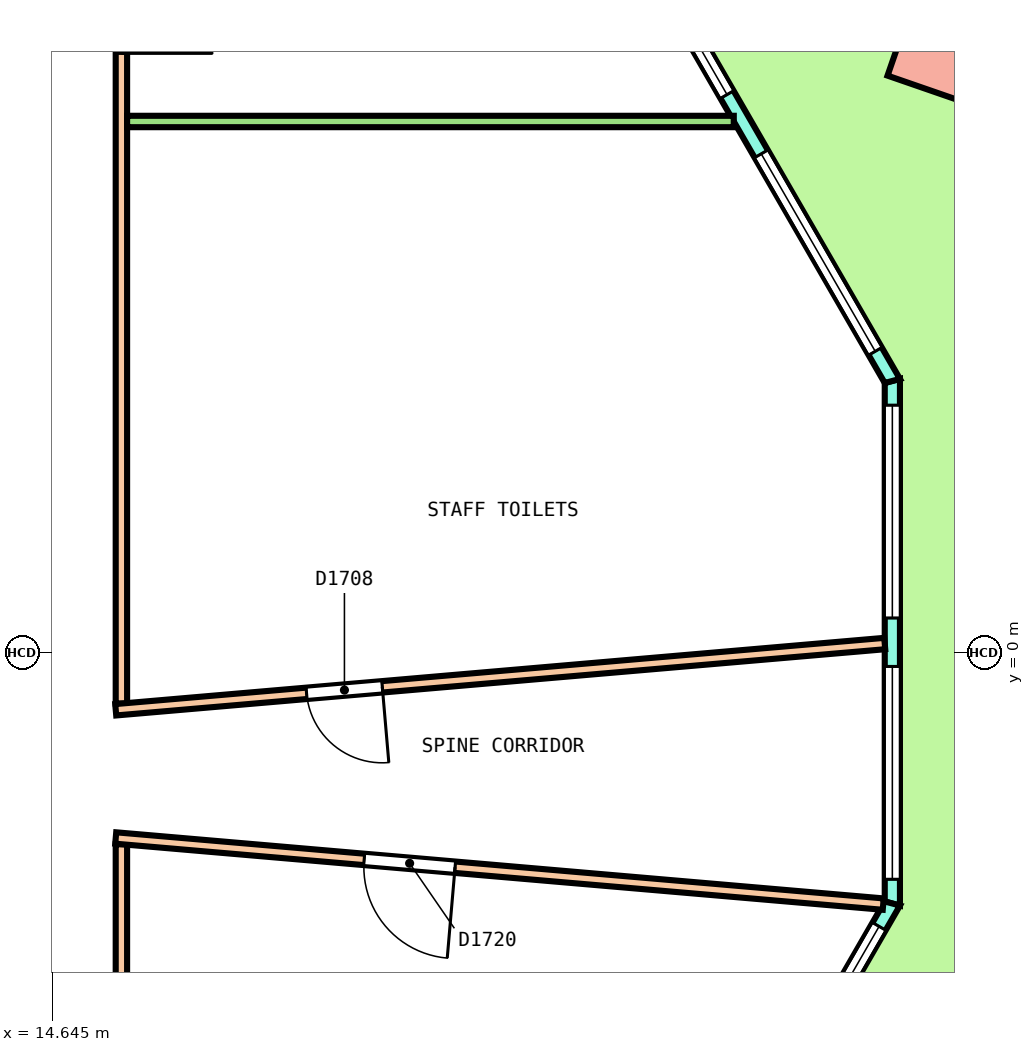
"""IFC4 building model, lengths in metres.
Left out: names, types, materials, properties, quantities, classifications, styles, units other than length and angle.
Written with IfcOpenShell. Run it as: python <this file> out.ifc"""

import sys

from ifc_helpers import new_model, si_unit, direction, frame, frame_2d, origin, origin_2d, place, context, subcontext, project, spatial, polyline, rectangle, outline, extrude, element, fill, save


model = new_model("IFC4")
c1 = context("Model", 3, precision=1e-05, world=origin(), true_north=direction((0.0, 1.0)))
c2 = subcontext(c1, "Body", "Model", "MODEL_VIEW")
j1 = project(units=[si_unit("LENGTHUNIT", "METRE"), si_unit("PLANEANGLEUNIT", "RADIAN")], contexts=[c1])
p1 = place(None, origin())
s1 = spatial("IfcSite", under=j1, at=p1, CompositionType="ELEMENT")
p2 = place(p1, origin())
s2 = spatial("IfcBuilding", under=s1, at=p2, CompositionType="ELEMENT")
p3 = place(p2, frame((0.0, 0.0, 149.6)))
s3 = spatial("IfcBuildingStorey", under=s2, at=p3, CompositionType="ELEMENT", Elevation=149.6)
p4 = place(p3, frame((26.393, 7.963, 0.0), z_axis=(0.021750699922, 0.025124769716, 0.999447673968), x_axis=(-0.500502376835, 0.865666925982, -0.010869408614)))
e1 = element("IfcColumn", 1, at=p4, inside=s3, PredefinedType="COLUMN", context=c2, shape_type="SweptSolid", body=[
    extrude(rectangle(XDim=1.2, YDim=1.2, at=origin_2d()), origin(), (0.0, 0.0, 1.0), 4.052),
])
p5 = place(p3, frame((25.693, -3.299, 0.0), z_axis=(0.0, 0.0, 1.0), x_axis=(0.0, 1.0, 0.0)))
e2 = element("IfcWall", 2, at=p5, inside=s3, PredefinedType="SOLIDWALL", context=c2, shape_type="SweptSolid", body=[
    extrude(outline(polyline([(-0.027, -0.1), (1.128, -0.1), (2.283, -0.1), (3.438, -0.1), (4.592, -0.1), (5.747, -0.1), (6.902, -0.1), (6.848, 0.1), (5.711, 0.1), (4.574, 0.1), (3.438, 0.1), (2.301, 0.1), (1.164, 0.1), (0.027, 0.1), (-0.027, -0.1)])), origin(), (0.0, 0.0, 1.0), 4.1),
])
p6 = place(p5, frame((0.319, 0.0, 0.1)))
e3 = element("IfcOpeningElement", 3, at=p6, cuts=e2, PredefinedType="OPENING", context=c2, shape_type="SweptSolid", body=[
    extrude(rectangle(XDim=2.8, YDim=2.9, at=frame_2d((1.4, 1.45))), frame((0.0, 0.11, 0.0), z_axis=(0.0, -1.0, 0.0), x_axis=(1.0, 0.0, 0.0)), (0.0, 0.0, 1.0), 0.22),
])
p7 = place(p5, frame((3.756, 0.0, 0.1)))
e4 = element("IfcOpeningElement", 4, at=p7, cuts=e2, PredefinedType="OPENING", context=c2, shape_type="SweptSolid", body=[
    extrude(rectangle(XDim=2.8, YDim=2.9, at=frame_2d((1.4, 1.45))), frame((0.0, 0.11, 0.0), z_axis=(0.0, -1.0, 0.0), x_axis=(1.0, 0.0, 0.0)), (0.0, 0.0, 1.0), 0.22),
])
p8 = place(p3, frame((25.693, 3.576, 0.0), z_axis=(0.0, 0.0, 1.0), x_axis=(-0.500002434251, 0.866023998365, 0.0)))
e5 = element("IfcWall", 5, at=p8, inside=s3, PredefinedType="SOLIDWALL", context=c2, shape_type="SweptSolid", body=[
    extrude(outline(polyline([(-0.027, -0.1), (1.002, -0.1), (2.031, -0.1), (3.061, -0.1), (4.09, -0.1), (5.119, -0.1), (6.148, -0.1), (7.177, -0.1), (8.206, -0.1), (9.235, -0.1), (10.264, -0.1), (11.293, -0.1), (12.323, -0.1), (13.352, -0.1), (14.381, -0.1), (15.41, -0.1), (16.439, -0.1), (17.468, -0.1), (18.497, -0.1), (19.526, -0.1), (19.473, 0.1), (18.449, 0.1), (17.426, 0.1), (16.402, 0.1), (15.379, 0.1), (14.355, 0.1), (13.332, 0.1), (12.308, 0.1), (11.285, 0.1), (10.261, 0.1), (9.238, 0.1), (8.215, 0.1), (7.191, 0.1), (6.168, 0.1), (5.144, 0.1), (4.121, 0.1), (3.097, 0.1), (2.074, 0.1), (1.05, 0.1), (0.027, 0.1), (-0.027, -0.1)])), origin(), (0.0, 0.0, 1.0), 4.1),
])
p9 = place(p8, frame((0.45, 0.0, 0.1)))
e6 = element("IfcOpeningElement", 6, at=p9, cuts=e5, PredefinedType="OPENING", context=c2, shape_type="SweptSolid", body=[
    extrude(rectangle(XDim=3.0, YDim=2.9, at=frame_2d((1.5, 1.45))), frame((0.0, 0.11, 0.0), z_axis=(0.0, -1.0, 0.0), x_axis=(1.0, 0.0, 0.0)), (0.0, 0.0, 1.0), 0.22),
])
p10 = place(p8, frame((4.35, 0.0, 0.1)))
e7 = element("IfcOpeningElement", 7, at=p10, cuts=e5, PredefinedType="OPENING", context=c2, shape_type="SweptSolid", body=[
    extrude(rectangle(XDim=3.0, YDim=2.9, at=frame_2d((1.5, 1.45))), frame((0.0, 0.11, 0.0), z_axis=(0.0, -1.0, 0.0), x_axis=(1.0, 0.0, 0.0)), (0.0, 0.0, 1.0), 0.22),
])
p11 = place(p8, frame((8.85, 0.0, 0.0)))
e8 = element("IfcOpeningElement", 8, at=p11, cuts=e5, PredefinedType="OPENING", context=c2, shape_type="SweptSolid", body=[
    extrude(rectangle(XDim=1.8, YDim=2.4, at=frame_2d((0.9, 1.2))), frame((0.0, 0.11, 0.0), z_axis=(0.0, -1.0, 0.0), x_axis=(1.0, 0.0, 0.0)), (0.0, 0.0, 1.0), 0.22),
])
p12 = place(p8, frame((8.85, 0.0, 2.55)))
e9 = element("IfcOpeningElement", 9, at=p12, cuts=e5, PredefinedType="OPENING", context=c2, shape_type="SweptSolid", body=[
    extrude(rectangle(XDim=1.8, YDim=0.45, at=frame_2d((0.9, 0.225))), frame((0.0, 0.11, 0.0), z_axis=(0.0, -1.0, 0.0), x_axis=(1.0, 0.0, 0.0)), (0.0, 0.0, 1.0), 0.22),
])
p13 = place(p8, frame((12.15, 0.0, 0.1)))
e10 = element("IfcOpeningElement", 10, at=p13, cuts=e5, PredefinedType="OPENING", context=c2, shape_type="SweptSolid", body=[
    extrude(rectangle(XDim=3.0, YDim=2.9, at=frame_2d((1.5, 1.45))), frame((0.0, 0.11, 0.0), z_axis=(0.0, -1.0, 0.0), x_axis=(1.0, 0.0, 0.0)), (0.0, 0.0, 1.0), 0.22),
])
p14 = place(p8, frame((16.05, 0.0, 0.1)))
e11 = element("IfcOpeningElement", 11, at=p14, cuts=e5, PredefinedType="OPENING", context=c2, shape_type="SweptSolid", body=[
    extrude(rectangle(XDim=3.0, YDim=2.9, at=frame_2d((1.5, 1.45))), frame((0.0, 0.11, 0.0), z_axis=(0.0, -1.0, 0.0), x_axis=(1.0, 0.0, 0.0)), (0.0, 0.0, 1.0), 0.22),
])
p15 = place(p3, frame((15.703, -20.601, 0.0), z_axis=(0.0, 0.0, 1.0), x_axis=(0.499997834957, 0.866026653769, 0.0)))
e12 = element("IfcWall", 12, at=p15, inside=s3, PredefinedType="SOLIDWALL", context=c2, shape_type="SweptSolid", body=[
    extrude(outline(polyline([(-0.027, -0.1), (1.028, -0.1), (2.082, -0.1), (3.136, -0.1), (4.19, -0.1), (5.245, -0.1), (6.299, -0.1), (7.354, -0.1), (8.408, -0.1), (9.462, -0.1), (10.516, -0.1), (11.571, -0.1), (12.625, -0.1), (13.679, -0.1), (14.734, -0.1), (15.788, -0.1), (16.842, -0.1), (17.897, -0.1), (18.951, -0.1), (20.005, -0.1), (19.952, 0.1), (18.903, 0.1), (17.854, 0.1), (16.806, 0.1), (15.757, 0.1), (14.708, 0.1), (13.66, 0.1), (12.611, 0.1), (11.562, 0.1), (10.514, 0.1), (9.465, 0.1), (8.416, 0.1), (7.368, 0.1), (6.319, 0.1), (5.27, 0.1), (4.221, 0.1), (3.173, 0.1), (2.124, 0.1), (1.075, 0.1), (0.027, 0.1), (-0.027, -0.1)])), origin(), (0.0, 0.0, 1.0), 4.1),
])
p16 = place(p15, frame((0.348, 0.0, 0.1)))
e13 = element("IfcOpeningElement", 13, at=p16, cuts=e12, PredefinedType="OPENING", context=c2, shape_type="SweptSolid", body=[
    extrude(rectangle(XDim=3.3, YDim=2.9, at=frame_2d((1.65, 1.45))), frame((0.0, 0.11, 0.0), z_axis=(0.0, -1.0, 0.0), x_axis=(1.0, 0.0, 0.0)), (0.0, 0.0, 1.0), 0.22),
])
p17 = place(p15, frame((4.344, 0.0, 0.1)))
e14 = element("IfcOpeningElement", 14, at=p17, cuts=e12, PredefinedType="OPENING", context=c2, shape_type="SweptSolid", body=[
    extrude(rectangle(XDim=3.3, YDim=2.9, at=frame_2d((1.65, 1.45))), frame((0.0, 0.11, 0.0), z_axis=(0.0, -1.0, 0.0), x_axis=(1.0, 0.0, 0.0)), (0.0, 0.0, 1.0), 0.22),
])
p18 = place(p15, frame((9.089, 0.0, 0.0)))
e15 = element("IfcOpeningElement", 15, at=p18, cuts=e12, PredefinedType="OPENING", context=c2, shape_type="SweptSolid", body=[
    extrude(rectangle(XDim=1.8, YDim=2.4, at=frame_2d((0.9, 1.2))), frame((0.0, 0.11, 0.0), z_axis=(0.0, -1.0, 0.0), x_axis=(1.0, 0.0, 0.0)), (0.0, 0.0, 1.0), 0.22),
])
p19 = place(p15, frame((9.089, 0.0, 2.55)))
e16 = element("IfcOpeningElement", 16, at=p19, cuts=e12, PredefinedType="OPENING", context=c2, shape_type="SweptSolid", body=[
    extrude(rectangle(XDim=1.8, YDim=0.45, at=frame_2d((0.9, 0.225))), frame((0.0, 0.11, 0.0), z_axis=(0.0, -1.0, 0.0), x_axis=(1.0, 0.0, 0.0)), (0.0, 0.0, 1.0), 0.22),
])
p20 = place(p15, frame((12.335, 0.0, 0.1)))
e17 = element("IfcOpeningElement", 17, at=p20, cuts=e12, PredefinedType="OPENING", context=c2, shape_type="SweptSolid", body=[
    extrude(rectangle(XDim=3.3, YDim=2.9, at=frame_2d((1.65, 1.45))), frame((0.0, 0.11, 0.0), z_axis=(0.0, -1.0, 0.0), x_axis=(1.0, 0.0, 0.0)), (0.0, 0.0, 1.0), 0.22),
])
p21 = place(p15, frame((16.331, 0.0, 0.1)))
e18 = element("IfcOpeningElement", 18, at=p21, cuts=e12, PredefinedType="OPENING", context=c2, shape_type="SweptSolid", body=[
    extrude(rectangle(XDim=3.3, YDim=2.9, at=frame_2d((1.65, 1.45))), frame((0.0, 0.11, 0.0), z_axis=(0.0, -1.0, 0.0), x_axis=(1.0, 0.0, 0.0)), (0.0, 0.0, 1.0), 0.22),
])
p22 = place(p3, frame((15.55, -10.375, 0.0), z_axis=(0.0, 0.0, 1.0), x_axis=(0.0, 1.0, 0.0)))
e19 = element("IfcWall", 19, at=p22, inside=s3, PredefinedType="PARTITIONING", context=c2, shape_type="SweptSolid", body=[
    extrude(rectangle(XDim=7.856, YDim=0.15, at=frame_2d((3.928, 0.0))), origin(), (0.0, 0.0, 1.0), 3.05),
])
p23 = place(p3, frame((15.55, -0.669, 0.0), z_axis=(0.0, 0.0, 1.0), x_axis=(0.0, 1.0, 0.0)))
e20 = element("IfcWall", 20, at=p23, inside=s3, PredefinedType="PARTITIONING", context=c2, shape_type="SweptSolid", body=[
    extrude(rectangle(XDim=11.044, YDim=0.15, at=frame_2d((5.522, 0.0))), origin(), (0.0, 0.0, 1.0), 3.05),
])
p24 = place(p23, frame((8.554, 0.0, 0.0)))
e21 = element("IfcOpeningElement", 21, at=p24, cuts=e20, PredefinedType="OPENING", context=c2, shape_type="SweptSolid", body=[
    extrude(rectangle(XDim=1.2, YDim=2.1, at=frame_2d((0.6, 1.05))), frame((0.0, 0.085, 0.0), z_axis=(0.0, -1.0, 0.0), x_axis=(1.0, 0.0, 0.0)), (0.0, 0.0, 1.0), 0.17),
])
p25 = place(p3, frame((15.475, -0.75, 0.0), z_axis=(0.0, 0.0, 1.0), x_axis=(0.99631178891, 0.085806871974, 0.0)))
e22 = element("IfcWall", 22, at=p25, inside=s3, PredefinedType="PARTITIONING", context=c2, shape_type="SweptSolid", body=[
    extrude(rectangle(XDim=10.155, YDim=0.15, at=frame_2d((5.077, 0.0))), origin(), (0.0, 0.0, 1.0), 3.05),
])
p26 = place(p25, frame((2.52, 0.0, 0.0)))
e23 = element("IfcOpeningElement", 23, at=p26, cuts=e22, PredefinedType="OPENING", context=c2, shape_type="SweptSolid", body=[
    extrude(rectangle(XDim=1.0, YDim=2.1, at=frame_2d((0.5, 1.05))), frame((0.0, 0.085, 0.0), z_axis=(0.0, -1.0, 0.0), x_axis=(1.0, 0.0, 0.0)), (0.0, 0.0, 1.0), 0.17),
])
p27 = place(p3, frame((15.475, -2.437, 0.0), z_axis=(0.0, 0.0, 1.0), x_axis=(0.99631166079, -0.085808359585, 0.0)))
e24 = element("IfcWall", 24, at=p27, inside=s3, PredefinedType="PARTITIONING", context=c2, shape_type="SweptSolid", body=[
    extrude(rectangle(XDim=10.135, YDim=0.15, at=frame_2d((5.067, 0.0))), origin(), (0.0, 0.0, 1.0), 3.05),
])
p28 = place(p27, frame((3.281, 0.0, 0.0)))
e25 = element("IfcOpeningElement", 25, at=p28, cuts=e24, PredefinedType="OPENING", context=c2, shape_type="SweptSolid", body=[
    extrude(rectangle(XDim=1.2, YDim=2.1, at=frame_2d((0.6, 1.05))), frame((0.0, 0.085, 0.0), z_axis=(0.0, -1.0, 0.0), x_axis=(1.0, 0.0, 0.0)), (0.0, 0.0, 1.0), 0.17),
])
p29 = place(p3, frame((15.625, 6.989, 0.0), z_axis=(0.0, 0.0, 1.0), x_axis=(1.0, 0.0, 0.0)))
e26 = element("IfcWall", 26, at=p29, inside=s3, PredefinedType="PARTITIONING", context=c2, shape_type="SweptSolid", body=[
    extrude(rectangle(XDim=7.981, YDim=0.15, at=frame_2d((3.991, 0.0))), origin(), (0.0, 0.0, 1.0), 3.05),
])
p30 = place(p6, origin())
e27 = element("IfcWindow", 27, at=p30, inside=s3, PartitioningType="SINGLE_PANEL", PredefinedType="WINDOW", context=c2, shape_type="SweptSolid", body=[
    extrude(rectangle(XDim=2.8, YDim=2.9, at=frame_2d((1.4, 1.45))), frame((0.0, 0.03, 0.0), z_axis=(0.0, -1.0, 0.0), x_axis=(1.0, 0.0, 0.0)), (0.0, 0.0, 1.0), 0.06),
])
fill(e3, e27)
p31 = place(p7, origin())
e28 = element("IfcWindow", 28, at=p31, inside=s3, PartitioningType="SINGLE_PANEL", PredefinedType="WINDOW", context=c2, shape_type="SweptSolid", body=[
    extrude(rectangle(XDim=2.8, YDim=2.9, at=frame_2d((1.4, 1.45))), frame((0.0, 0.03, 0.0), z_axis=(0.0, -1.0, 0.0), x_axis=(1.0, 0.0, 0.0)), (0.0, 0.0, 1.0), 0.06),
])
fill(e4, e28)
p32 = place(p9, origin())
e29 = element("IfcWindow", 29, at=p32, inside=s3, PartitioningType="SINGLE_PANEL", PredefinedType="WINDOW", context=c2, shape_type="SweptSolid", body=[
    extrude(rectangle(XDim=3.0, YDim=2.9, at=frame_2d((1.5, 1.45))), frame((0.0, 0.03, 0.0), z_axis=(0.0, -1.0, 0.0), x_axis=(1.0, 0.0, 0.0)), (0.0, 0.0, 1.0), 0.06),
])
fill(e6, e29)
p33 = place(p10, origin())
e30 = element("IfcWindow", 30, at=p33, inside=s3, PartitioningType="SINGLE_PANEL", PredefinedType="WINDOW", context=c2, shape_type="SweptSolid", body=[
    extrude(rectangle(XDim=3.0, YDim=2.9, at=frame_2d((1.5, 1.45))), frame((0.0, 0.03, 0.0), z_axis=(0.0, -1.0, 0.0), x_axis=(1.0, 0.0, 0.0)), (0.0, 0.0, 1.0), 0.06),
])
fill(e7, e30)
p34 = place(p21, origin())
e31 = element("IfcWindow", 31, at=p34, inside=s3, PartitioningType="SINGLE_PANEL", PredefinedType="WINDOW", context=c2, shape_type="SweptSolid", body=[
    extrude(rectangle(XDim=3.3, YDim=2.9, at=frame_2d((1.65, 1.45))), frame((0.0, 0.03, 0.0), z_axis=(0.0, -1.0, 0.0), x_axis=(1.0, 0.0, 0.0)), (0.0, 0.0, 1.0), 0.06),
])
fill(e18, e31)
p35 = place(p26, origin())
e32 = element("IfcDoor", 32, at=p35, inside=s3, OperationType="SINGLE_SWING_LEFT", PredefinedType="DOOR", context=c2, shape_type="SweptSolid", body=[
    extrude(rectangle(XDim=1.0, YDim=2.1, at=frame_2d((0.5, 1.05))), frame((0.0, 0.025, 0.0), z_axis=(0.0, -1.0, 0.0), x_axis=(1.0, 0.0, 0.0)), (0.0, 0.0, 1.0), 0.05),
])
fill(e23, e32)
p36 = place(p24, origin())
e33 = element("IfcDoor", 33, at=p36, inside=s3, OperationType="DOUBLE_DOOR_SINGLE_SWING", PredefinedType="DOOR", context=c2, shape_type="SweptSolid", body=[
    extrude(rectangle(XDim=1.2, YDim=2.1, at=frame_2d((0.6, 1.05))), frame((0.0, 0.025, 0.0), z_axis=(0.0, -1.0, 0.0), x_axis=(1.0, 0.0, 0.0)), (0.0, 0.0, 1.0), 0.05),
])
fill(e21, e33)
p37 = place(p28, origin())
e34 = element("IfcDoor", 34, at=p37, inside=s3, OperationType="DOUBLE_DOOR_SINGLE_SWING", PredefinedType="DOOR", context=c2, shape_type="SweptSolid", body=[
    extrude(rectangle(XDim=1.2, YDim=2.1, at=frame_2d((0.6, 1.05))), frame((0.0, 0.025, 0.0), z_axis=(0.0, -1.0, 0.0), x_axis=(1.0, 0.0, 0.0)), (0.0, 0.0, 1.0), 0.05),
])
fill(e25, e34)
save(model, sys.argv[1])
